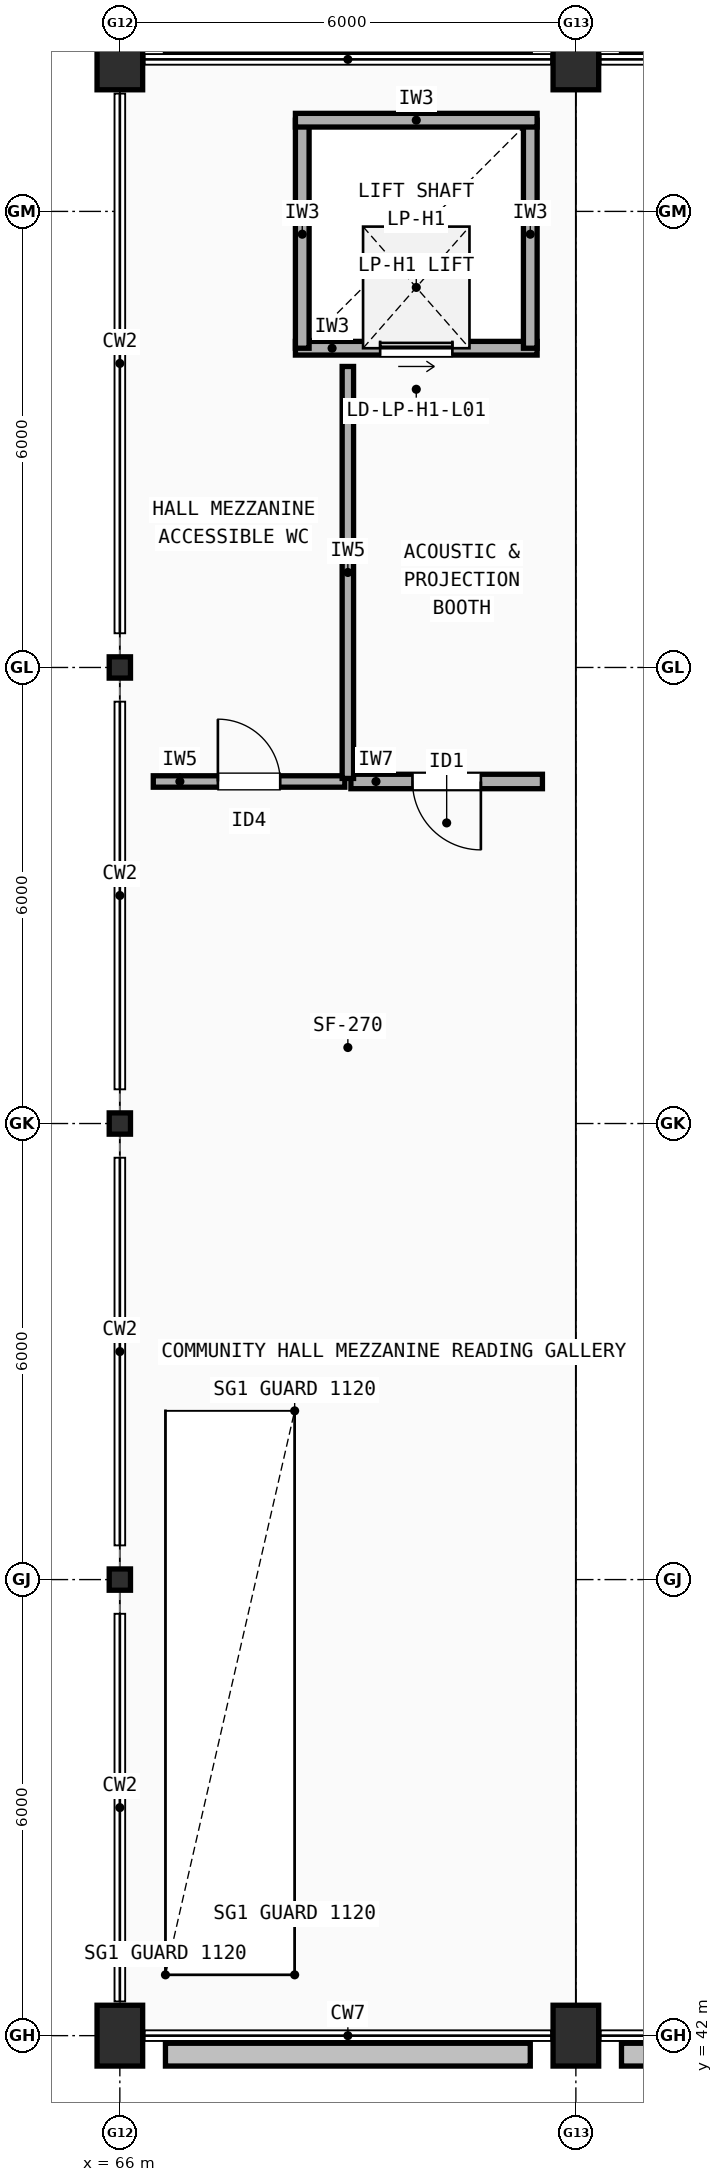
"""IFC4 building model, lengths in metres.
Left out: names, types, materials, properties, quantities, classifications, styles, units other than length and angle.
Written with IfcOpenShell. Run it as: python <this file> out.ifc"""

import sys

from ifc_helpers import new_model, si_unit, direction, frame, frame_2d, origin, origin_2d, place, context, subcontext, project, spatial, rectangle, i_section, extrude, element, fill, save


model = new_model("IFC4")
c1 = context("Model", 3, precision=1e-05, world=origin(), true_north=direction((0.0, 1.0)))
c2 = subcontext(c1, "Body", "Model", "MODEL_VIEW")
j1 = project(units=[si_unit("LENGTHUNIT", "METRE"), si_unit("PLANEANGLEUNIT", "RADIAN")], contexts=[c1])
p1 = place(None, origin())
s1 = spatial("IfcSite", under=j1, at=p1, CompositionType="ELEMENT")
p2 = place(p1, origin())
s2 = spatial("IfcBuilding", under=s1, at=p2, CompositionType="ELEMENT")
p3 = place(p2, frame((0.0, 0.0, 4.5)))
s3 = spatial("IfcBuildingStorey", under=s2, at=p3, CompositionType="ELEMENT", Elevation=4.5)
p4 = place(p3, frame((66.0, 42.0, 0.0), z_axis=(0.0, 0.0, 1.0), x_axis=(1.0, 0.0, 0.0)))
e1 = element("IfcColumn", 1, at=p4, inside=s3, PredefinedType="COLUMN", context=c2, shape_type="SweptSolid", body=[
    extrude(rectangle(XDim=0.6, YDim=0.8, at=origin_2d()), origin(), (0.0, 0.0, 1.0), 1.72),
])
for number, where, z_axis, x_axis in (
    (2, (66.0, 48.0, 0.0), (0.0, 0.0, 1.0), (1.0, 0.0, 0.0)),
    (3, (66.0, 54.0, 0.0), (0.0, 0.0, 1.0), (1.0, 0.0, 0.0)),
    (4, (66.0, 60.0, 0.0), (0.0, 0.0, 1.0), (1.0, 0.0, 0.0)),
):
    element("IfcColumn", number, at=place(p3, frame(where, z_axis=z_axis, x_axis=x_axis)), inside=s3, PredefinedType="COLUMN", context=c2, shape_type="SweptSolid", body=[
        extrude(i_section(OverallWidth=0.28, OverallDepth=0.28, WebThickness=0.01, FlangeThickness=0.018, FilletRadius=0.024, at=origin_2d()), origin(), (0.0, 0.0, 1.0), 1.72),
    ])
for number, where, z_axis, x_axis in (
    (5, (66.0, 68.0, 0.0), (0.0, 0.0, 1.0), (1.0, 0.0, 0.0)),
    (6, (72.0, 42.0, 0.0), (0.0, 0.0, 1.0), (1.0, 0.0, 0.0)),
    (7, (72.0, 68.0, 0.0), (0.0, 0.0, 1.0), (1.0, 0.0, 0.0)),
):
    element("IfcColumn", number, at=place(p3, frame(where, z_axis=z_axis, x_axis=x_axis)), inside=s3, PredefinedType="COLUMN", context=c2, shape_type="SweptSolid", body=[
        extrude(rectangle(XDim=0.6, YDim=0.8, at=origin_2d()), origin(), (0.0, 0.0, 1.0), 1.72),
    ])
p5 = place(p3, frame((68.31, 64.2, 0.0), z_axis=(0.0, 0.0, 1.0), x_axis=(1.0, 0.0, 0.0)))
e8 = element("IfcWall", 8, at=p5, inside=s3, PredefinedType="SOLIDWALL", context=c2, shape_type="SweptSolid", body=[
    extrude(rectangle(XDim=3.18, YDim=0.18, at=frame_2d((1.59, 0.0))), origin(), (0.0, 0.0, 1.0), 2.35),
])
p6 = place(p5, frame((1.115, 0.0, 0.0)))
e9 = element("IfcOpeningElement", 9, at=p6, cuts=e8, PredefinedType="OPENING", context=c2, shape_type="SweptSolid", body=[
    extrude(rectangle(XDim=0.95, YDim=2.15, at=frame_2d((0.475, 1.075))), frame((0.0, 0.1, 0.0), z_axis=(0.0, -1.0, 0.0), x_axis=(1.0, 0.0, 0.0)), (0.0, 0.0, 1.0), 0.2),
])
for number, where, z_axis, x_axis in (
    (10, (68.4, 67.2, 0.0), (0.0, 0.0, 1.0), (0.0, -1.0, 0.0)),
    (11, (71.4, 64.2, 0.0), (0.0, 0.0, 1.0), (0.0, 1.0, 0.0)),
):
    element("IfcWall", number, at=place(p3, frame(where, z_axis=z_axis, x_axis=x_axis)), inside=s3, PredefinedType="SOLIDWALL", context=c2, shape_type="SweptSolid", body=[
        extrude(rectangle(XDim=3.0, YDim=0.18, at=frame_2d((1.5, 0.0))), origin(), (0.0, 0.0, 1.0), 2.35),
    ])
p7 = place(p3, frame((71.49, 67.2, 0.0), z_axis=(0.0, 0.0, 1.0), x_axis=(-1.0, 0.0, 0.0)))
e12 = element("IfcWall", 12, at=p7, inside=s3, PredefinedType="SOLIDWALL", context=c2, shape_type="SweptSolid", body=[
    extrude(rectangle(XDim=3.18, YDim=0.18, at=frame_2d((1.59, 0.0))), origin(), (0.0, 0.0, 1.0), 2.35),
])
p8 = place(p3, frame((66.44, 58.5, 0.0), z_axis=(0.0, 0.0, 1.0), x_axis=(1.0, 0.0, 0.0)))
e13 = element("IfcWall", 13, at=p8, inside=s3, PredefinedType="PARTITIONING", context=c2, shape_type="SweptSolid", body=[
    extrude(rectangle(XDim=2.52, YDim=0.15, at=frame_2d((1.26, 0.0))), origin(), (0.0, 0.0, 1.0), 2.945),
])
p9 = place(p8, frame((0.85, 0.0, 0.0)))
e14 = element("IfcOpeningElement", 14, at=p9, cuts=e13, PredefinedType="OPENING", context=c2, shape_type="SweptSolid", body=[
    extrude(rectangle(XDim=0.82, YDim=2.08, at=frame_2d((0.41, 1.04))), frame((0.0, 0.085, 0.0), z_axis=(0.0, -1.0, 0.0), x_axis=(1.0, 0.0, 0.0)), (0.0, 0.0, 1.0), 0.17),
])
p10 = place(p3, frame((69.04, 58.5, 0.0), z_axis=(0.0, 0.0, 1.0), x_axis=(1.0, 0.0, 0.0)))
e15 = element("IfcWall", 15, at=p10, inside=s3, PredefinedType="SOLIDWALL", context=c2, shape_type="SweptSolid", body=[
    extrude(rectangle(XDim=2.52, YDim=0.19, at=frame_2d((1.26, 0.0))), origin(), (0.0, 0.0, 1.0), 2.945),
])
p11 = place(p10, frame((0.81, 0.0, 0.0)))
e16 = element("IfcOpeningElement", 16, at=p11, cuts=e15, PredefinedType="OPENING", context=c2, shape_type="SweptSolid", body=[
    extrude(rectangle(XDim=0.9, YDim=2.1, at=frame_2d((0.45, 1.05))), frame((0.0, 0.105, 0.0), z_axis=(0.0, -1.0, 0.0), x_axis=(1.0, 0.0, 0.0)), (0.0, 0.0, 1.0), 0.21),
])
p12 = place(p3, frame((69.0, 58.54, 0.0), z_axis=(0.0, 0.0, 1.0), x_axis=(0.0, 1.0, 0.0)))
e17 = element("IfcWall", 17, at=p12, inside=s3, PredefinedType="PARTITIONING", context=c2, shape_type="SweptSolid", body=[
    extrude(rectangle(XDim=5.42, YDim=0.15, at=frame_2d((2.71, 0.0))), origin(), (0.0, 0.0, 1.0), 2.945),
])
p13 = place(p6, frame((0.95, 0.0, 0.0), z_axis=(0.0, 0.0, 1.0), x_axis=(-1.0, 0.0, 0.0)))
e18 = element("IfcDoor", 18, at=p13, inside=s3, OperationType="SLIDING_TO_LEFT", PredefinedType="DOOR", context=c2, shape_type="SweptSolid", body=[
    extrude(rectangle(XDim=0.95, YDim=2.15, at=frame_2d((0.475, 1.075))), frame((0.0, 0.025, 0.0), z_axis=(0.0, -1.0, 0.0), x_axis=(1.0, 0.0, 0.0)), (0.0, 0.0, 1.0), 0.05),
])
fill(e9, e18)
p14 = place(p9, origin())
e19 = element("IfcDoor", 19, at=p14, inside=s3, OperationType="SINGLE_SWING_LEFT", PredefinedType="DOOR", context=c2, shape_type="SweptSolid", body=[
    extrude(rectangle(XDim=0.82, YDim=2.08, at=frame_2d((0.41, 1.04))), frame((0.0, 0.025, 0.0), z_axis=(0.0, -1.0, 0.0), x_axis=(1.0, 0.0, 0.0)), (0.0, 0.0, 1.0), 0.05),
])
fill(e14, e19)
p15 = place(p11, origin())
e20 = element("IfcDoor", 20, at=p15, inside=s3, OperationType="SINGLE_SWING_RIGHT", PredefinedType="DOOR", context=c2, shape_type="SweptSolid", body=[
    extrude(rectangle(XDim=0.9, YDim=2.1, at=frame_2d((0.45, 1.05))), frame((0.0, 0.025, 0.0), z_axis=(0.0, -1.0, 0.0), x_axis=(1.0, 0.0, 0.0)), (0.0, 0.0, 1.0), 0.05),
])
fill(e16, e20)
save(model, sys.argv[1])
